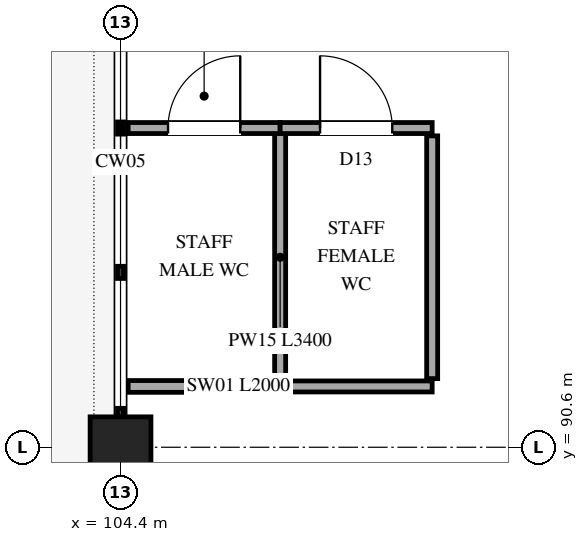
"""IFC4 building model, lengths in metres.
Left out: names, types, materials, properties, quantities, classifications, styles, units other than length and angle.
Written with IfcOpenShell. Run it as: python <this file> out.ifc"""

import sys

from ifc_helpers import new_model, si_unit, direction, frame, frame_2d, origin, origin_2d, place, context, subcontext, project, spatial, rectangle, extrude, element, fill, save


model = new_model("IFC4")
c1 = context("Model", 3, precision=1e-05, world=origin(), true_north=direction((0.0, 1.0)))
c2 = subcontext(c1, "Body", "Model", "MODEL_VIEW")
j1 = project(units=[si_unit("LENGTHUNIT", "METRE"), si_unit("PLANEANGLEUNIT", "RADIAN")], contexts=[c1])
p1 = place(None, origin())
s1 = spatial("IfcSite", under=j1, at=p1, CompositionType="ELEMENT")
p2 = place(p1, origin())
s2 = spatial("IfcBuilding", under=s1, at=p2, CompositionType="ELEMENT")
p3 = place(p2, frame((0.0, 0.0, 16.5)))
s3 = spatial("IfcBuildingStorey", under=s2, at=p3, CompositionType="ELEMENT", Elevation=16.5)
p4 = place(p3, frame((104.4, 90.6, 0.0), z_axis=(0.0, 0.0, 1.0), x_axis=(1.0, 0.0, 0.0)))
e1 = element("IfcColumn", 1, at=p4, inside=s3, PredefinedType="COLUMN", context=c2, shape_type="SweptSolid", body=[
    extrude(rectangle(XDim=0.8, YDim=0.8, at=origin_2d()), origin(), (0.0, 0.0, 1.0), 5.1),
])
p5 = place(p3, frame((106.5, 94.8, 0.0), z_axis=(0.0, 0.0, 1.0), x_axis=(0.0, -1.0, 0.0)))
e2 = element("IfcWall", 2, at=p5, inside=s3, PredefinedType="PARTITIONING", context=c2, shape_type="SweptSolid", body=[
    extrude(rectangle(XDim=3.4, YDim=0.145, at=frame_2d((1.7, 0.0))), origin(), (0.0, 0.0, 1.0), 4.76),
])
p6 = place(p3, frame((104.5, 94.8, 0.0), z_axis=(0.0, 0.0, 1.0), x_axis=(1.0, 0.0, 0.0)))
e3 = element("IfcWall", 3, at=p6, inside=s3, PredefinedType="PARTITIONING", context=c2, shape_type="SweptSolid", body=[
    extrude(rectangle(XDim=2.0, YDim=0.145, at=frame_2d((1.0, 0.0))), origin(), (0.0, 0.0, 1.0), 4.275),
])
p7 = place(p6, frame((0.525, 0.0, 0.0)))
e4 = element("IfcOpeningElement", 4, at=p7, cuts=e3, PredefinedType="OPENING", context=c2, shape_type="SweptSolid", body=[
    extrude(rectangle(XDim=0.95, YDim=2.15, at=frame_2d((0.475, 1.075))), frame((0.0, 0.083, 0.0), z_axis=(0.0, -1.0, 0.0), x_axis=(1.0, 0.0, 0.0)), (0.0, 0.0, 1.0), 0.165),
])
p8 = place(p3, frame((106.5, 91.4, 0.0), z_axis=(0.0, 0.0, 1.0), x_axis=(-1.0, 0.0, 0.0)))
e5 = element("IfcWall", 5, at=p8, inside=s3, PredefinedType="MOVABLE", context=c2, shape_type="SweptSolid", body=[
    extrude(rectangle(XDim=2.0, YDim=0.155, at=frame_2d((1.0, 0.0))), origin(), (0.0, 0.0, 1.0), 4.275),
])
p9 = place(p3, frame((106.5, 94.8, 0.0), z_axis=(0.0, 0.0, 1.0), x_axis=(1.0, 0.0, 0.0)))
e6 = element("IfcWall", 6, at=p9, inside=s3, PredefinedType="PARTITIONING", context=c2, shape_type="SweptSolid", body=[
    extrude(rectangle(XDim=2.0, YDim=0.145, at=frame_2d((1.0, 0.0))), origin(), (0.0, 0.0, 1.0), 4.76),
])
p10 = place(p9, frame((0.525, 0.0, 0.0)))
e7 = element("IfcOpeningElement", 7, at=p10, cuts=e6, PredefinedType="OPENING", context=c2, shape_type="SweptSolid", body=[
    extrude(rectangle(XDim=0.95, YDim=2.2, at=frame_2d((0.475, 1.1))), frame((0.0, 0.083, 0.0), z_axis=(0.0, -1.0, 0.0), x_axis=(1.0, 0.0, 0.0)), (0.0, 0.0, 1.0), 0.165),
])
p11 = place(p3, frame((108.5, 91.4, 0.0), z_axis=(0.0, 0.0, 1.0), x_axis=(-1.0, 0.0, 0.0)))
e8 = element("IfcWall", 8, at=p11, inside=s3, PredefinedType="PARTITIONING", context=c2, shape_type="SweptSolid", body=[
    extrude(rectangle(XDim=2.0, YDim=0.145, at=frame_2d((1.0, 0.0))), origin(), (0.0, 0.0, 1.0), 4.76),
])
p12 = place(p3, frame((108.5, 94.697, 0.0), z_axis=(0.0, 0.0, 1.0), x_axis=(0.0, -1.0, 0.0)))
e9 = element("IfcWall", 9, at=p12, inside=s3, PredefinedType="PARTITIONING", context=c2, shape_type="SweptSolid", body=[
    extrude(rectangle(XDim=3.194, YDim=0.145, at=frame_2d((1.597, 0.0))), origin(), (0.0, 0.0, 1.0), 4.76),
])
p13 = place(p7, origin())
e10 = element("IfcDoor", 10, at=p13, inside=s3, OperationType="SINGLE_SWING_RIGHT", PredefinedType="DOOR", context=c2, shape_type="SweptSolid", body=[
    extrude(rectangle(XDim=0.95, YDim=2.15, at=frame_2d((0.475, 1.075))), frame((0.0, 0.025, 0.0), z_axis=(0.0, -1.0, 0.0), x_axis=(1.0, 0.0, 0.0)), (0.0, 0.0, 1.0), 0.05),
])
fill(e4, e10)
p14 = place(p10, origin())
e11 = element("IfcDoor", 11, at=p14, inside=s3, OperationType="SINGLE_SWING_LEFT", PredefinedType="DOOR", context=c2, shape_type="SweptSolid", body=[
    extrude(rectangle(XDim=0.95, YDim=2.2, at=frame_2d((0.475, 1.1))), frame((0.0, 0.025, 0.0), z_axis=(0.0, -1.0, 0.0), x_axis=(1.0, 0.0, 0.0)), (0.0, 0.0, 1.0), 0.05),
])
fill(e7, e11)
save(model, sys.argv[1])
